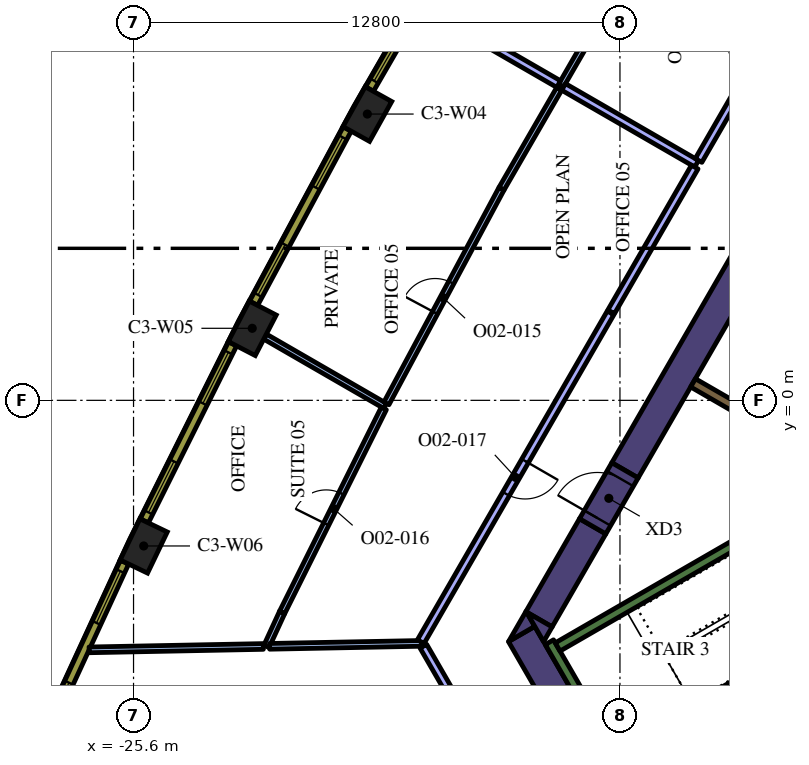
"""IFC4 building model, lengths in metres.
Left out: names, types, materials, properties, quantities, classifications, styles, units other than length and angle.
Written with IfcOpenShell. Run it as: python <this file> out.ifc"""

import sys

from ifc_helpers import new_model, si_unit, direction, frame, frame_2d, origin, origin_2d, place, context, subcontext, project, spatial, polyline, rectangle, outline, extrude, element, fill, save


model = new_model("IFC4")
c1 = context("Model", 3, precision=1e-05, world=origin(), true_north=direction((0.0, 1.0)))
c2 = subcontext(c1, "Body", "Model", "MODEL_VIEW")
j1 = project(units=[si_unit("LENGTHUNIT", "METRE"), si_unit("PLANEANGLEUNIT", "RADIAN")], contexts=[c1])
p1 = place(None, origin())
s1 = spatial("IfcSite", under=j1, at=p1, CompositionType="ELEMENT")
p2 = place(p1, origin())
s2 = spatial("IfcBuilding", under=s1, at=p2, CompositionType="ELEMENT")
p3 = place(p2, frame((0.0, 0.0, 154.2)))
s3 = spatial("IfcBuildingStorey", under=s2, at=p3, CompositionType="ELEMENT", Elevation=154.2)
for number, where, z_axis, x_axis in (
    (1, (-19.447, 7.533, 0.0), (0.0, 0.0, 1.0), (-0.487, -0.874, 0.0)),
    (2, (-22.476, 1.896, 0.0), (0.0, 0.0, 1.0), (-0.46, -0.888, 0.0)),
    (3, (-25.332, -3.832, 0.0), (0.0, 0.0, 1.0), (-0.433, -0.902, 0.0)),
):
    element("IfcColumn", number, at=place(p3, frame(where, z_axis=z_axis, x_axis=x_axis)), inside=s3, PredefinedType="COLUMN", context=c2, shape_type="SweptSolid", body=[
        extrude(rectangle(XDim=1.2, YDim=0.8, at=origin_2d()), origin(), (0.0, 0.0, 1.0), 4.2),
    ])
p4 = place(p3, frame((-15.387, -6.148, 0.0), z_axis=(0.0, 0.0, 1.0), x_axis=(0.499984020225, -0.866034629516, 0.0)))
e4 = element("IfcWall", 4, at=p4, inside=s3, PredefinedType="SOLIDWALL", context=c2, shape_type="SweptSolid", body=[
    extrude(rectangle(XDim=3.824, YDim=0.8, at=frame_2d((1.912, 0.0))), origin(), (0.0, 0.0, 1.0), 4.2),
])
p5 = place(p3, origin())
e5 = element("IfcWall", 5, at=p5, inside=s3, PredefinedType="SOLIDWALL", context=c2, shape_type="SweptSolid", body=[
    extrude(outline(polyline([(-15.042, -5.947), (-15.729, -6.343), (-15.271, -5.55), (-15.042, -5.947)])), origin(), (0.0, 0.0, 1.0), 4.2),
])
p6 = place(p3, frame((-13.518, -3.314, 0.0), z_axis=(0.0, 0.0, 1.0), x_axis=(-0.499969377405, -0.866043083026, 0.0)))
e6 = element("IfcWall", 6, at=p6, inside=s3, PredefinedType="SOLIDWALL", context=c2, shape_type="SweptSolid", body=[
    extrude(rectangle(XDim=2.824, YDim=0.8, at=frame_2d((1.412, 0.0))), origin(), (0.0, 0.0, 1.0), 4.2),
])
e7 = element("IfcWall", 7, at=p5, inside=s3, PredefinedType="SOLIDWALL", context=c2, shape_type="SweptSolid", body=[
    extrude(outline(polyline([(-14.809, -6.35), (-15.257, -5.574), (-14.585, -5.962), (-14.809, -6.35)])), origin(), (0.0, 0.0, 1.0), 4.2),
])
p7 = place(p3, frame((-12.668, -1.842, 0.0), z_axis=(0.0, 0.0, 1.0), x_axis=(0.500003640647, 0.866023301845, 0.0)))
e8 = element("IfcWall", 8, at=p7, inside=s3, PredefinedType="SOLIDWALL", context=c2, shape_type="SweptSolid", body=[
    extrude(rectangle(XDim=15.858, YDim=0.8, at=frame_2d((7.929, 0.0))), origin(), (0.0, 0.0, 1.0), 4.2),
])
p8 = place(p3, frame((-12.84, -9.511, 0.0), z_axis=(0.0, 0.0, 1.0), x_axis=(-0.499997733992, 0.866026712061, 0.0)))
e9 = element("IfcWall", 9, at=p8, inside=s3, PredefinedType="SOLIDWALL", context=c2, shape_type="SweptSolid", body=[
    extrude(rectangle(XDim=3.634, YDim=0.25, at=frame_2d((1.817, 0.0))), origin(), (0.0, 0.0, 1.0), 4.2),
])
p9 = place(p3, frame((-14.44, -6.49, 0.0), z_axis=(0.0, 0.0, 1.0), x_axis=(0.866022966069, 0.500004222222, 0.0)))
e10 = element("IfcWall", 10, at=p9, inside=s3, PredefinedType="SOLIDWALL", context=c2, shape_type="SweptSolid", body=[
    extrude(rectangle(XDim=6.8, YDim=0.25, at=frame_2d((3.4, 0.0))), origin(), (0.0, 0.0, 1.0), 4.2),
])
p10 = place(p3, frame((-12.84, -9.261, 0.0), z_axis=(0.0, 0.0, 1.0), x_axis=(0.866016039709, 0.500016218704, 0.0)))
e11 = element("IfcWall", 11, at=p10, inside=s3, PredefinedType="SOLIDWALL", context=c2, shape_type="SweptSolid", body=[
    extrude(rectangle(XDim=7.05, YDim=0.25, at=frame_2d((3.525, 0.0))), origin(), (0.0, 0.0, 1.0), 4.2),
])
p11 = place(p3, frame((-8.106, -1.14, 0.0), z_axis=(0.0, 0.0, 1.0), x_axis=(-0.866008981251, 0.500028443584, 0.0)))
e12 = element("IfcWall", 12, at=p11, inside=s3, PredefinedType="SOLIDWALL", context=c2, shape_type="SweptSolid", body=[
    extrude(rectangle(XDim=3.2, YDim=0.25, at=frame_2d((1.6, 0.0))), origin(), (0.0, 0.0, 1.0), 4.2),
])
p12 = place(p3, frame((-13.518, -3.314, 0.0), z_axis=(0.0, 0.0, 1.0), x_axis=(0.500062241894, 0.865989465428, 0.0)))
e13 = element("IfcWall", 13, at=p12, inside=s3, PredefinedType="SOLIDWALL", context=c2, shape_type="SweptSolid", body=[
    extrude(rectangle(XDim=1.7, YDim=0.8, at=frame_2d((0.85, 0.0))), origin(), (0.0, 0.0, 1.0), 4.2),
])
p13 = place(p12, frame((0.25, 0.0, 0.0)))
e14 = element("IfcOpeningElement", 14, at=p13, cuts=e13, PredefinedType="OPENING", context=c2, shape_type="SweptSolid", body=[
    extrude(rectangle(XDim=1.2, YDim=2.1, at=frame_2d((0.6, 1.05))), frame((0.0, 0.41, 0.0), z_axis=(0.0, -1.0, 0.0), x_axis=(1.0, 0.0, 0.0)), (0.0, 0.0, 1.0), 0.82),
])
p14 = place(p3, frame((-12.779, 11.002, 0.0), z_axis=(0.0, 0.0, 1.0), x_axis=(-0.499996312652, -0.866027532665, 0.0)))
e15 = element("IfcWall", 15, at=p14, inside=s3, PredefinedType="PARTITIONING", context=c2, shape_type="SweptSolid", body=[
    extrude(rectangle(XDim=3.138, YDim=0.15, at=frame_2d((1.569, 0.0))), origin(), (0.0, 0.0, 1.0), 3.15),
])
p15 = place(p3, frame((-14.413, 8.322, 0.0), z_axis=(0.0, 0.0, 1.0), x_axis=(-0.866034795751, 0.499983732284, 0.0)))
e16 = element("IfcWall", 16, at=p15, inside=s3, PredefinedType="PARTITIONING", context=c2, shape_type="SweptSolid", body=[
    extrude(rectangle(XDim=4.125, YDim=0.2, at=frame_2d((2.062, 0.0))), origin(), (0.0, 0.0, 1.0), 3.15),
])
p16 = place(p3, frame((-10.782, 6.225, 0.0), z_axis=(0.0, 0.0, 1.0), x_axis=(-0.866034752867, 0.499983806564, 0.0)))
e17 = element("IfcWall", 17, at=p16, inside=s3, PredefinedType="PARTITIONING", context=c2, shape_type="SweptSolid", body=[
    extrude(rectangle(XDim=4.043, YDim=0.2, at=frame_2d((2.021, 0.0))), origin(), (0.0, 0.0, 1.0), 3.15),
])
p17 = place(p3, frame((-8.532, 10.122, 0.0), z_axis=(0.0, 0.0, 1.0), x_axis=(-0.499988222896, -0.866032203192, 0.0)))
e18 = element("IfcWall", 18, at=p17, inside=s3, PredefinedType="PARTITIONING", context=c2, shape_type="SweptSolid", body=[
    extrude(rectangle(XDim=4.4, YDim=0.2, at=frame_2d((2.2, 0.0))), origin(), (0.0, 0.0, 1.0), 3.15),
])
p18 = place(p3, frame((-18.98, -0.147, 0.0), z_axis=(0.0, 0.0, 1.0), x_axis=(-0.866035116605, 0.499983176524, 0.0)))
e19 = element("IfcWall", 19, at=p18, inside=s3, PredefinedType="PARTITIONING", context=c2, shape_type="SweptSolid", body=[
    extrude(rectangle(XDim=3.648, YDim=0.15, at=frame_2d((1.824, 0.0))), origin(), (0.0, 0.0, 1.0), 3.15),
])
p19 = place(p3, frame((-14.398, 8.198, 0.0), z_axis=(0.0, 0.0, 1.0), x_axis=(-0.499993740961, -0.866029017412, 0.0)))
e20 = element("IfcWall", 20, at=p19, inside=s3, PredefinedType="PARTITIONING", context=c2, shape_type="SweptSolid", body=[
    extrude(rectangle(XDim=3.038, YDim=0.15, at=frame_2d((1.519, 0.0))), origin(), (0.0, 0.0, 1.0), 3.15),
])
p20 = place(p3, frame((-18.945, -0.081, 0.0), z_axis=(0.0, 0.0, 1.0), x_axis=(0.472485737981, 0.881338316088, 0.0)))
e21 = element("IfcWall", 21, at=p20, inside=s3, PredefinedType="PARTITIONING", context=c2, shape_type="SweptSolid", body=[
    extrude(rectangle(XDim=6.407, YDim=0.15, at=frame_2d((3.204, 0.0))), origin(), (0.0, 0.0, 1.0), 3.15),
])
p21 = place(p20, frame((2.707, 0.0, 0.0)))
e22 = element("IfcOpeningElement", 22, at=p21, cuts=e21, PredefinedType="OPENING", context=c2, shape_type="SweptSolid", body=[
    extrude(rectangle(XDim=0.9, YDim=2.1, at=frame_2d((0.45, 1.05))), frame((0.0, 0.085, 0.0), z_axis=(0.0, -1.0, 0.0), x_axis=(1.0, 0.0, 0.0)), (0.0, 0.0, 1.0), 0.17),
])
p22 = place(p3, frame((-21.689, -5.579, 0.0), z_axis=(0.0, 0.0, 1.0), x_axis=(0.446219729364, 0.894923434225, 0.0)))
e23 = element("IfcWall", 23, at=p22, inside=s3, PredefinedType="PARTITIONING", context=c2, shape_type="SweptSolid", body=[
    extrude(rectangle(XDim=5.995, YDim=0.15, at=frame_2d((2.998, 0.0))), origin(), (0.0, 0.0, 1.0), 3.15),
])
p23 = place(p22, frame((2.595, 0.0, 0.0)))
e24 = element("IfcOpeningElement", 24, at=p23, cuts=e23, PredefinedType="OPENING", context=c2, shape_type="SweptSolid", body=[
    extrude(rectangle(XDim=0.9, YDim=2.1, at=frame_2d((0.45, 1.05))), frame((0.0, 0.085, 0.0), z_axis=(0.0, -1.0, 0.0), x_axis=(1.0, 0.0, 0.0)), (0.0, 0.0, 1.0), 0.17),
])
p24 = place(p3, frame((-21.689, -5.579, 0.0), z_axis=(0.0, 0.0, 1.0), x_axis=(-0.418649696334, -0.908147802816, 0.0)))
e25 = element("IfcWall", 25, at=p24, inside=s3, PredefinedType="PARTITIONING", context=c2, shape_type="SweptSolid", body=[
    extrude(rectangle(XDim=0.986, YDim=0.15, at=frame_2d((0.493, 0.0))), origin(), (0.0, 0.0, 1.0), 3.15),
])
p25 = place(p3, frame((-22.185, -6.476, 0.0), z_axis=(0.0, 0.0, 1.0), x_axis=(-0.999810025733, -0.019491342784, 0.0)))
e26 = element("IfcWall", 26, at=p25, inside=s3, PredefinedType="PARTITIONING", context=c2, shape_type="SweptSolid", body=[
    extrude(rectangle(XDim=4.584, YDim=0.15, at=frame_2d((2.292, 0.0))), origin(), (0.0, 0.0, 1.0), 3.15),
])
p26 = place(p3, frame((-18.016, -6.395, 0.0), z_axis=(0.0, 0.0, 1.0), x_axis=(-0.999809528944, -0.019516808959, 0.0)))
e27 = element("IfcWall", 27, at=p26, inside=s3, PredefinedType="PARTITIONING", context=c2, shape_type="SweptSolid", body=[
    extrude(rectangle(XDim=4.003, YDim=0.15, at=frame_2d((2.001, 0.0))), origin(), (0.0, 0.0, 1.0), 3.15),
])
p27 = place(p3, frame((-10.832, 6.138, 0.0), z_axis=(0.0, 0.0, 1.0), x_axis=(-0.499988222896, -0.866032203192, 0.0)))
e28 = element("IfcWall", 28, at=p27, inside=s3, PredefinedType="PARTITIONING", context=c2, shape_type="SweptSolid", body=[
    extrude(rectangle(XDim=4.4, YDim=0.2, at=frame_2d((2.2, 0.0))), origin(), (0.0, 0.0, 1.0), 3.15),
])
p28 = place(p3, frame((-13.047, 2.302, 0.0), z_axis=(0.0, 0.0, 1.0), x_axis=(-0.499986873641, -0.866032982159, 0.0)))
e29 = element("IfcWall", 29, at=p28, inside=s3, PredefinedType="PARTITIONING", context=c2, shape_type="SweptSolid", body=[
    extrude(rectangle(XDim=9.99, YDim=0.2, at=frame_2d((4.995, 0.0))), origin(), (0.0, 0.0, 1.0), 3.15),
])
p29 = place(p28, frame((4.5, 0.0, 0.0)))
e30 = element("IfcOpeningElement", 30, at=p29, cuts=e29, PredefinedType="OPENING", context=c2, shape_type="SweptSolid", body=[
    extrude(rectangle(XDim=1.0, YDim=2.1, at=frame_2d((0.5, 1.05))), frame((0.0, 0.11, 0.0), z_axis=(0.0, -1.0, 0.0), x_axis=(1.0, 0.0, 0.0)), (0.0, 0.0, 1.0), 0.22),
])
p30 = place(p3, frame((-17.974, -6.469, 0.0), z_axis=(0.0, 0.0, 1.0), x_axis=(0.499961062019, -0.866047883471, 0.0)))
e31 = element("IfcWall", 31, at=p30, inside=s3, PredefinedType="PARTITIONING", context=c2, shape_type="SweptSolid", body=[
    extrude(rectangle(XDim=2.185, YDim=0.2, at=frame_2d((1.092, 0.0))), origin(), (0.0, 0.0, 1.0), 3.15),
])
p31 = place(p3, frame((-16.789, 12.697, 0.0), z_axis=(0.0, 0.0, 1.0), x_axis=(-0.500009456303, -0.866019944116, 0.0)))
e32 = element("IfcWall", 32, at=p31, inside=s3, PredefinedType="SOLIDWALL", context=c2, shape_type="SweptSolid", body=[
    extrude(rectangle(XDim=5.204, YDim=0.24, at=frame_2d((2.602, 0.0))), origin(), (0.0, 0.0, 1.0), 3.95),
])
p32 = place(p31, frame((0.248, 0.0, 0.9)))
e33 = element("IfcOpeningElement", 33, at=p32, cuts=e32, PredefinedType="OPENING", context=c2, shape_type="SweptSolid", body=[
    extrude(rectangle(XDim=1.5, YDim=2.55, at=frame_2d((0.75, 1.275))), frame((0.0, 0.13, 0.0), z_axis=(0.0, -1.0, 0.0), x_axis=(1.0, 0.0, 0.0)), (0.0, 0.0, 1.0), 0.26),
])
p33 = place(p31, frame((3.455, 0.0, 0.9)))
e34 = element("IfcOpeningElement", 34, at=p33, cuts=e32, PredefinedType="OPENING", context=c2, shape_type="SweptSolid", body=[
    extrude(rectangle(XDim=1.5, YDim=2.55, at=frame_2d((0.75, 1.275))), frame((0.0, 0.13, 0.0), z_axis=(0.0, -1.0, 0.0), x_axis=(1.0, 0.0, 0.0)), (0.0, 0.0, 1.0), 0.26),
])
p34 = place(p3, frame((-19.977, 7.139, 0.0), z_axis=(0.0, 0.0, 1.0), x_axis=(-0.473349833294, -0.880874528704, 0.0)))
e35 = element("IfcWall", 35, at=p34, inside=s3, PredefinedType="SOLIDWALL", context=c2, shape_type="SweptSolid", body=[
    extrude(rectangle(XDim=5.204, YDim=0.24, at=frame_2d((2.602, 0.0))), origin(), (0.0, 0.0, 1.0), 3.95),
])
p35 = place(p34, frame((0.248, 0.0, 0.9)))
e36 = element("IfcOpeningElement", 36, at=p35, cuts=e35, PredefinedType="OPENING", context=c2, shape_type="SweptSolid", body=[
    extrude(rectangle(XDim=1.5, YDim=2.55, at=frame_2d((0.75, 1.275))), frame((0.0, 0.13, 0.0), z_axis=(0.0, -1.0, 0.0), x_axis=(1.0, 0.0, 0.0)), (0.0, 0.0, 1.0), 0.26),
])
p36 = place(p34, frame((3.455, 0.0, 0.9)))
e37 = element("IfcOpeningElement", 37, at=p36, cuts=e35, PredefinedType="OPENING", context=c2, shape_type="SweptSolid", body=[
    extrude(rectangle(XDim=1.5, YDim=2.55, at=frame_2d((0.75, 1.275))), frame((0.0, 0.13, 0.0), z_axis=(0.0, -1.0, 0.0), x_axis=(1.0, 0.0, 0.0)), (0.0, 0.0, 1.0), 0.26),
])
p37 = place(p3, frame((-22.994, 1.485, 0.0), z_axis=(0.0, 0.0, 1.0), x_axis=(-0.446256171312, -0.8949052629, 0.0)))
e38 = element("IfcWall", 38, at=p37, inside=s3, PredefinedType="SOLIDWALL", context=c2, shape_type="SweptSolid", body=[
    extrude(rectangle(XDim=5.203, YDim=0.24, at=frame_2d((2.602, 0.0))), origin(), (0.0, 0.0, 1.0), 3.95),
])
p38 = place(p37, frame((0.248, 0.0, 0.9)))
e39 = element("IfcOpeningElement", 39, at=p38, cuts=e38, PredefinedType="OPENING", context=c2, shape_type="SweptSolid", body=[
    extrude(rectangle(XDim=1.5, YDim=2.55, at=frame_2d((0.75, 1.275))), frame((0.0, 0.13, 0.0), z_axis=(0.0, -1.0, 0.0), x_axis=(1.0, 0.0, 0.0)), (0.0, 0.0, 1.0), 0.26),
])
p39 = place(p37, frame((3.455, 0.0, 0.9)))
e40 = element("IfcOpeningElement", 40, at=p39, cuts=e38, PredefinedType="OPENING", context=c2, shape_type="SweptSolid", body=[
    extrude(rectangle(XDim=1.5, YDim=2.55, at=frame_2d((0.75, 1.275))), frame((0.0, 0.13, 0.0), z_axis=(0.0, -1.0, 0.0), x_axis=(1.0, 0.0, 0.0)), (0.0, 0.0, 1.0), 0.26),
])
p40 = place(p3, frame((-25.837, -4.258, 0.0), z_axis=(0.0, 0.0, 1.0), x_axis=(-0.418722559465, -0.908114209885, 0.0)))
e41 = element("IfcWall", 41, at=p40, inside=s3, PredefinedType="SOLIDWALL", context=c2, shape_type="SweptSolid", body=[
    extrude(rectangle(XDim=5.213, YDim=0.24, at=frame_2d((2.606, 0.0))), origin(), (0.0, 0.0, 1.0), 3.95),
])
p41 = place(p40, frame((0.261, 0.0, 0.9)))
e42 = element("IfcOpeningElement", 42, at=p41, cuts=e41, PredefinedType="OPENING", context=c2, shape_type="SweptSolid", body=[
    extrude(rectangle(XDim=1.5, YDim=2.55, at=frame_2d((0.75, 1.275))), frame((0.0, 0.13, 0.0), z_axis=(0.0, -1.0, 0.0), x_axis=(1.0, 0.0, 0.0)), (0.0, 0.0, 1.0), 0.26),
])
p42 = place(p40, frame((3.492, 0.0, 0.9)))
e43 = element("IfcOpeningElement", 43, at=p42, cuts=e41, PredefinedType="OPENING", context=c2, shape_type="SweptSolid", body=[
    extrude(rectangle(XDim=1.5, YDim=2.55, at=frame_2d((0.75, 1.275))), frame((0.0, 0.13, 0.0), z_axis=(0.0, -1.0, 0.0), x_axis=(1.0, 0.0, 0.0)), (0.0, 0.0, 1.0), 0.26),
])
p43 = place(p13, origin())
e44 = element("IfcDoor", 44, at=p43, inside=s3, OperationType="SINGLE_SWING_LEFT", PredefinedType="DOOR", context=c2, shape_type="SweptSolid", body=[
    extrude(rectangle(XDim=1.2, YDim=2.1, at=frame_2d((0.6, 1.05))), frame((0.0, 0.025, 0.0), z_axis=(0.0, -1.0, 0.0), x_axis=(1.0, 0.0, 0.0)), (0.0, 0.0, 1.0), 0.05),
])
fill(e14, e44)
p44 = place(p21, origin())
e45 = element("IfcDoor", 45, at=p44, inside=s3, OperationType="SINGLE_SWING_LEFT", PredefinedType="DOOR", context=c2, shape_type="SweptSolid", body=[
    extrude(rectangle(XDim=0.9, YDim=2.1, at=frame_2d((0.45, 1.05))), frame((0.0, 0.025, 0.0), z_axis=(0.0, -1.0, 0.0), x_axis=(1.0, 0.0, 0.0)), (0.0, 0.0, 1.0), 0.05),
])
fill(e22, e45)
p45 = place(p23, origin())
e46 = element("IfcDoor", 46, at=p45, inside=s3, OperationType="SINGLE_SWING_RIGHT", PredefinedType="DOOR", context=c2, shape_type="SweptSolid", body=[
    extrude(rectangle(XDim=0.9, YDim=2.1, at=frame_2d((0.45, 1.05))), frame((0.0, 0.025, 0.0), z_axis=(0.0, -1.0, 0.0), x_axis=(1.0, 0.0, 0.0)), (0.0, 0.0, 1.0), 0.05),
])
fill(e24, e46)
p46 = place(p29, origin())
e47 = element("IfcDoor", 47, at=p46, inside=s3, OperationType="SINGLE_SWING_RIGHT", PredefinedType="DOOR", context=c2, shape_type="SweptSolid", body=[
    extrude(rectangle(XDim=1.0, YDim=2.1, at=frame_2d((0.5, 1.05))), frame((0.0, 0.025, 0.0), z_axis=(0.0, -1.0, 0.0), x_axis=(1.0, 0.0, 0.0)), (0.0, 0.0, 1.0), 0.05),
])
fill(e30, e47)
p47 = place(p33, origin())
e48 = element("IfcWindow", 48, at=p47, inside=s3, PartitioningType="SINGLE_PANEL", PredefinedType="WINDOW", context=c2, shape_type="SweptSolid", body=[
    extrude(rectangle(XDim=1.5, YDim=2.55, at=frame_2d((0.75, 1.275))), frame((0.0, 0.04, 0.0), z_axis=(0.0, -1.0, 0.0), x_axis=(1.0, 0.0, 0.0)), (0.0, 0.0, 1.0), 0.06),
])
fill(e34, e48)
p48 = place(p35, origin())
e49 = element("IfcWindow", 49, at=p48, inside=s3, PartitioningType="SINGLE_PANEL", PredefinedType="WINDOW", context=c2, shape_type="SweptSolid", body=[
    extrude(rectangle(XDim=1.5, YDim=2.55, at=frame_2d((0.75, 1.275))), frame((0.0, 0.04, 0.0), z_axis=(0.0, -1.0, 0.0), x_axis=(1.0, 0.0, 0.0)), (0.0, 0.0, 1.0), 0.06),
])
fill(e36, e49)
p49 = place(p36, origin())
e50 = element("IfcWindow", 50, at=p49, inside=s3, PartitioningType="SINGLE_PANEL", PredefinedType="WINDOW", context=c2, shape_type="SweptSolid", body=[
    extrude(rectangle(XDim=1.5, YDim=2.55, at=frame_2d((0.75, 1.275))), frame((0.0, 0.04, 0.0), z_axis=(0.0, -1.0, 0.0), x_axis=(1.0, 0.0, 0.0)), (0.0, 0.0, 1.0), 0.06),
])
fill(e37, e50)
p50 = place(p38, origin())
e51 = element("IfcWindow", 51, at=p50, inside=s3, PartitioningType="SINGLE_PANEL", PredefinedType="WINDOW", context=c2, shape_type="SweptSolid", body=[
    extrude(rectangle(XDim=1.5, YDim=2.55, at=frame_2d((0.75, 1.275))), frame((0.0, 0.04, 0.0), z_axis=(0.0, -1.0, 0.0), x_axis=(1.0, 0.0, 0.0)), (0.0, 0.0, 1.0), 0.06),
])
fill(e39, e51)
p51 = place(p39, origin())
e52 = element("IfcWindow", 52, at=p51, inside=s3, PartitioningType="SINGLE_PANEL", PredefinedType="WINDOW", context=c2, shape_type="SweptSolid", body=[
    extrude(rectangle(XDim=1.5, YDim=2.55, at=frame_2d((0.75, 1.275))), frame((0.0, 0.04, 0.0), z_axis=(0.0, -1.0, 0.0), x_axis=(1.0, 0.0, 0.0)), (0.0, 0.0, 1.0), 0.06),
])
fill(e40, e52)
p52 = place(p41, origin())
e53 = element("IfcWindow", 53, at=p52, inside=s3, PartitioningType="SINGLE_PANEL", PredefinedType="WINDOW", context=c2, shape_type="SweptSolid", body=[
    extrude(rectangle(XDim=1.5, YDim=2.55, at=frame_2d((0.75, 1.275))), frame((0.0, 0.04, 0.0), z_axis=(0.0, -1.0, 0.0), x_axis=(1.0, 0.0, 0.0)), (0.0, 0.0, 1.0), 0.06),
])
fill(e42, e53)
p53 = place(p42, origin())
e54 = element("IfcWindow", 54, at=p53, inside=s3, PartitioningType="SINGLE_PANEL", PredefinedType="WINDOW", context=c2, shape_type="SweptSolid", body=[
    extrude(rectangle(XDim=1.5, YDim=2.55, at=frame_2d((0.75, 1.275))), frame((0.0, 0.04, 0.0), z_axis=(0.0, -1.0, 0.0), x_axis=(1.0, 0.0, 0.0)), (0.0, 0.0, 1.0), 0.06),
])
fill(e43, e54)
save(model, sys.argv[1])
